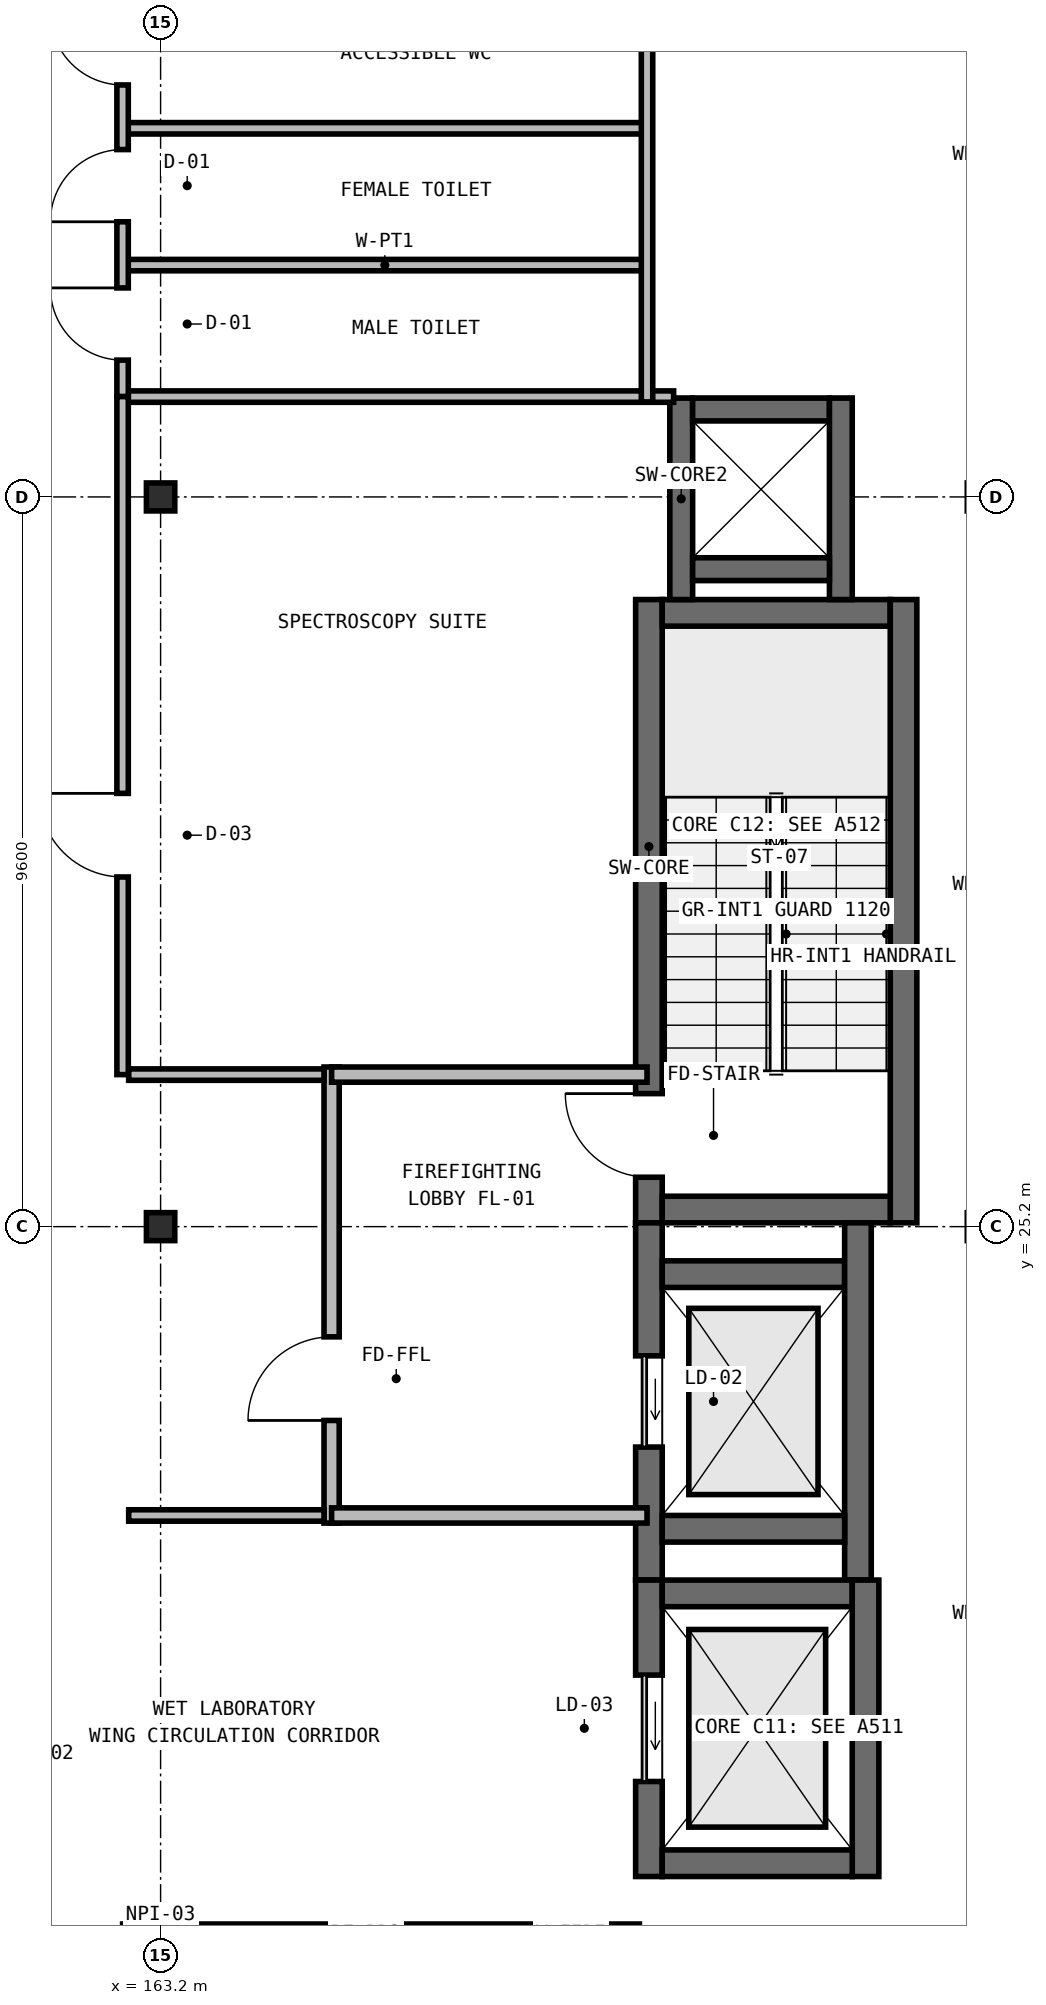
"""IFC4 building model, lengths in metres.
Left out: names, types, materials, properties, quantities, classifications, styles, units other than length and angle.
Written with IfcOpenShell. Run it as: python <this file> out.ifc"""

import sys

from ifc_helpers import new_model, si_unit, direction, frame, frame_2d, origin, origin_2d, place, context, subcontext, project, spatial, rectangle, i_section, extrude, element, fill, save


model = new_model("IFC4")
c1 = context("Model", 3, precision=1e-05, world=origin(), true_north=direction((0.0, 1.0)))
c2 = subcontext(c1, "Body", "Model", "MODEL_VIEW")
j1 = project(units=[si_unit("LENGTHUNIT", "METRE"), si_unit("PLANEANGLEUNIT", "RADIAN")], contexts=[c1])
p1 = place(None, origin())
s1 = spatial("IfcSite", under=j1, at=p1, CompositionType="ELEMENT")
p2 = place(p1, origin())
s2 = spatial("IfcBuilding", under=s1, at=p2, CompositionType="ELEMENT")
p3 = place(p2, frame((0.0, 0.0, 23.45)))
s3 = spatial("IfcBuildingStorey", under=s2, at=p3, CompositionType="ELEMENT", Elevation=23.45)
p4 = place(p3, frame((169.625, 25.25, 0.0), z_axis=(0.0, 0.0, 1.0), x_axis=(0.0, 1.0, 0.0)))
e1 = element("IfcWall", 1, at=p4, inside=s3, PredefinedType="SHEAR", context=c2, shape_type="SweptSolid", body=[
    extrude(rectangle(XDim=8.2, YDim=0.35, at=frame_2d((4.1, 0.0))), origin(), (0.0, 0.0, 1.0), 4.55),
])
p5 = place(p4, frame((0.6, 0.0, 0.0)))
e2 = element("IfcOpeningElement", 2, at=p5, cuts=e1, PredefinedType="OPENING", context=c2, shape_type="SweptSolid", body=[
    extrude(rectangle(XDim=1.1, YDim=2.15, at=frame_2d((0.55, 1.075))), frame((0.0, 0.185, 0.0), z_axis=(0.0, -1.0, 0.0), x_axis=(1.0, 0.0, 0.0)), (0.0, 0.0, 1.0), 0.37),
])
p6 = place(p3, frame((169.8, 33.275, 0.0), z_axis=(0.0, 0.0, 1.0), x_axis=(1.0, 0.0, 0.0)))
e3 = element("IfcWall", 3, at=p6, inside=s3, PredefinedType="SHEAR", context=c2, shape_type="SweptSolid", body=[
    extrude(rectangle(XDim=3.0, YDim=0.35, at=frame_2d((1.5, 0.0))), origin(), (0.0, 0.0, 1.0), 4.55),
])
p7 = place(p3, frame((172.975, 33.45, 0.0), z_axis=(0.0, 0.0, 1.0), x_axis=(0.0, -1.0, 0.0)))
e4 = element("IfcWall", 4, at=p7, inside=s3, PredefinedType="SHEAR", context=c2, shape_type="SweptSolid", body=[
    extrude(rectangle(XDim=8.2, YDim=0.35, at=frame_2d((4.1, 0.0))), origin(), (0.0, 0.0, 1.0), 4.55),
])
p8 = place(p3, frame((172.8, 25.425, 0.0), z_axis=(0.0, 0.0, 1.0), x_axis=(-1.0, 0.0, 0.0)))
e5 = element("IfcWall", 5, at=p8, inside=s3, PredefinedType="SHEAR", context=c2, shape_type="SweptSolid", body=[
    extrude(rectangle(XDim=3.0, YDim=0.35, at=frame_2d((1.5, 0.0))), origin(), (0.0, 0.0, 1.0), 4.55),
])
p9 = place(p3, frame((169.625, 20.55, 0.0), z_axis=(0.0, 0.0, 1.0), x_axis=(0.0, 1.0, 0.0)))
e6 = element("IfcWall", 6, at=p9, inside=s3, PredefinedType="SHEAR", context=c2, shape_type="SweptSolid", body=[
    extrude(rectangle(XDim=4.7, YDim=0.35, at=frame_2d((2.35, 0.0))), origin(), (0.0, 0.0, 1.0), 4.55),
])
p10 = place(p9, frame((1.75, 0.0, 0.0)))
e7 = element("IfcOpeningElement", 7, at=p10, cuts=e6, PredefinedType="OPENING", context=c2, shape_type="SweptSolid", body=[
    extrude(rectangle(XDim=1.2, YDim=2.15, at=frame_2d((0.6, 1.075))), frame((0.0, 0.185, 0.0), z_axis=(0.0, -1.0, 0.0), x_axis=(1.0, 0.0, 0.0)), (0.0, 0.0, 1.0), 0.37),
])
p11 = place(p3, frame((169.8, 24.575, 0.0), z_axis=(0.0, 0.0, 1.0), x_axis=(1.0, 0.0, 0.0)))
e8 = element("IfcWall", 8, at=p11, inside=s3, PredefinedType="SHEAR", context=c2, shape_type="SweptSolid", body=[
    extrude(rectangle(XDim=2.4, YDim=0.35, at=frame_2d((1.2, 0.0))), origin(), (0.0, 0.0, 1.0), 4.55),
])
p12 = place(p3, frame((172.375, 25.25, 0.0), z_axis=(0.0, 0.0, 1.0), x_axis=(0.0, -1.0, 0.0)))
e9 = element("IfcWall", 9, at=p12, inside=s3, PredefinedType="SHEAR", context=c2, shape_type="SweptSolid", body=[
    extrude(rectangle(XDim=4.7, YDim=0.35, at=frame_2d((2.35, 0.0))), origin(), (0.0, 0.0, 1.0), 4.55),
])
p13 = place(p3, frame((172.2, 21.225, 0.0), z_axis=(0.0, 0.0, 1.0), x_axis=(-1.0, 0.0, 0.0)))
e10 = element("IfcWall", 10, at=p13, inside=s3, PredefinedType="SHEAR", context=c2, shape_type="SweptSolid", body=[
    extrude(rectangle(XDim=2.4, YDim=0.35, at=frame_2d((1.2, 0.0))), origin(), (0.0, 0.0, 1.0), 4.55),
])
p14 = place(p3, frame((169.625, 16.65, 0.0), z_axis=(0.0, 0.0, 1.0), x_axis=(0.0, 1.0, 0.0)))
e11 = element("IfcWall", 11, at=p14, inside=s3, PredefinedType="SHEAR", context=c2, shape_type="SweptSolid", body=[
    extrude(rectangle(XDim=3.9, YDim=0.35, at=frame_2d((1.95, 0.0))), origin(), (0.0, 0.0, 1.0), 4.55),
])
p15 = place(p14, frame((1.25, 0.0, 0.0)))
e12 = element("IfcOpeningElement", 12, at=p15, cuts=e11, PredefinedType="OPENING", context=c2, shape_type="SweptSolid", body=[
    extrude(rectangle(XDim=1.4, YDim=2.3, at=frame_2d((0.7, 1.15))), frame((0.0, 0.185, 0.0), z_axis=(0.0, -1.0, 0.0), x_axis=(1.0, 0.0, 0.0)), (0.0, 0.0, 1.0), 0.37),
])
p16 = place(p3, frame((169.8, 20.375, 0.0), z_axis=(0.0, 0.0, 1.0), x_axis=(1.0, 0.0, 0.0)))
e13 = element("IfcWall", 13, at=p16, inside=s3, PredefinedType="SHEAR", context=c2, shape_type="SweptSolid", body=[
    extrude(rectangle(XDim=2.5, YDim=0.35, at=frame_2d((1.25, 0.0))), origin(), (0.0, 0.0, 1.0), 4.55),
])
p17 = place(p3, frame((172.475, 20.55, 0.0), z_axis=(0.0, 0.0, 1.0), x_axis=(0.0, -1.0, 0.0)))
e14 = element("IfcWall", 14, at=p17, inside=s3, PredefinedType="SHEAR", context=c2, shape_type="SweptSolid", body=[
    extrude(rectangle(XDim=3.9, YDim=0.35, at=frame_2d((1.95, 0.0))), origin(), (0.0, 0.0, 1.0), 4.55),
])
p18 = place(p3, frame((172.3, 16.825, 0.0), z_axis=(0.0, 0.0, 1.0), x_axis=(-1.0, 0.0, 0.0)))
e15 = element("IfcWall", 15, at=p18, inside=s3, PredefinedType="SHEAR", context=c2, shape_type="SweptSolid", body=[
    extrude(rectangle(XDim=2.5, YDim=0.35, at=frame_2d((1.25, 0.0))), origin(), (0.0, 0.0, 1.0), 4.55),
])
for number, where, z_axis, x_axis in (
    (16, (163.2, 25.2, 0.0), (0.0, 0.0, 1.0), (1.0, 0.0, 0.0)),
    (17, (163.2, 34.8, 0.0), (0.0, 0.0, 1.0), (1.0, 0.0, 0.0)),
):
    element("IfcColumn", number, at=place(p3, frame(where, z_axis=z_axis, x_axis=x_axis)), inside=s3, PredefinedType="COLUMN", context=c2, shape_type="SweptSolid", body=[
        extrude(i_section(OverallWidth=0.373, OverallDepth=0.368, WebThickness=0.017, FlangeThickness=0.027, at=origin_2d()), origin(), (0.0, 0.0, 1.0), 4.55),
    ])
p19 = place(p3, frame((170.05, 33.45, 0.0), z_axis=(0.0, 0.0, 1.0), x_axis=(0.0, 1.0, 0.0)))
e18 = element("IfcWall", 18, at=p19, inside=s3, PredefinedType="SHEAR", context=c2, shape_type="SweptSolid", body=[
    extrude(rectangle(XDim=2.65, YDim=0.3, at=frame_2d((1.325, 0.0))), origin(), (0.0, 0.0, 1.0), 4.37),
])
p20 = place(p3, frame((170.2, 35.95, 0.0), z_axis=(0.0, 0.0, 1.0), x_axis=(1.0, 0.0, 0.0)))
e19 = element("IfcWall", 19, at=p20, inside=s3, PredefinedType="SHEAR", context=c2, shape_type="SweptSolid", body=[
    extrude(rectangle(XDim=1.8, YDim=0.3, at=frame_2d((0.9, 0.0))), origin(), (0.0, 0.0, 1.0), 4.37),
])
p21 = place(p3, frame((172.15, 36.1, 0.0), z_axis=(0.0, 0.0, 1.0), x_axis=(0.0, -1.0, 0.0)))
e20 = element("IfcWall", 20, at=p21, inside=s3, PredefinedType="SHEAR", context=c2, shape_type="SweptSolid", body=[
    extrude(rectangle(XDim=2.65, YDim=0.3, at=frame_2d((1.325, 0.0))), origin(), (0.0, 0.0, 1.0), 4.37),
])
p22 = place(p3, frame((172.0, 33.85, 0.0), z_axis=(0.0, 0.0, 1.0), x_axis=(-1.0, 0.0, 0.0)))
e21 = element("IfcWall", 21, at=p22, inside=s3, PredefinedType="SHEAR", context=c2, shape_type="SweptSolid", body=[
    extrude(rectangle(XDim=1.8, YDim=0.3, at=frame_2d((0.9, 0.0))), origin(), (0.0, 0.0, 1.0), 4.37),
])
p23 = place(p3, frame((165.45, 21.3, 0.0), z_axis=(0.0, 0.0, 1.0), x_axis=(0.0, 1.0, 0.0)))
e22 = element("IfcWall", 22, at=p23, inside=s3, PredefinedType="SOLIDWALL", context=c2, shape_type="SweptSolid", body=[
    extrude(rectangle(XDim=6.0, YDim=0.2, at=frame_2d((3.0, 0.0))), origin(), (0.0, 0.0, 1.0), 4.3),
])
p24 = place(p23, frame((1.35, 0.0, 0.0)))
e23 = element("IfcOpeningElement", 23, at=p24, cuts=e22, PredefinedType="OPENING", context=c2, shape_type="SweptSolid", body=[
    extrude(rectangle(XDim=1.1, YDim=2.15, at=frame_2d((0.55, 1.075))), frame((0.0, 0.11, 0.0), z_axis=(0.0, -1.0, 0.0), x_axis=(1.0, 0.0, 0.0)), (0.0, 0.0, 1.0), 0.22),
])
for number, where, z_axis, x_axis in (
    (24, (165.45, 21.4, 0.0), (0.0, 0.0, 1.0), (1.0, 0.0, 0.0)),
    (25, (165.45, 27.2, 0.0), (0.0, 0.0, 1.0), (1.0, 0.0, 0.0)),
):
    element("IfcWall", number, at=place(p3, frame(where, z_axis=z_axis, x_axis=x_axis)), inside=s3, PredefinedType="SOLIDWALL", context=c2, shape_type="SweptSolid", body=[
        extrude(rectangle(XDim=4.15, YDim=0.2, at=frame_2d((2.075, 0.0))), origin(), (0.0, 0.0, 1.0), 4.3),
    ])
for number, where, z_axis, x_axis in (
    (26, (162.7, 37.85, 0.0), (0.0, 0.0, 1.0), (1.0, 0.0, 0.0)),
    (27, (162.7, 39.65, 0.0), (0.0, 0.0, 1.0), (1.0, 0.0, 0.0)),
):
    element("IfcWall", number, at=place(p3, frame(where, z_axis=z_axis, x_axis=x_axis)), inside=s3, PredefinedType="PARTITIONING", context=c2, shape_type="SweptSolid", body=[
        extrude(rectangle(XDim=6.9, YDim=0.15, at=frame_2d((3.45, 0.0))), origin(), (0.0, 0.0, 1.0), 4.3),
    ])
p25 = place(p3, frame((162.7, 36.12, 0.0), z_axis=(0.0, 0.0, 1.0), x_axis=(1.0, 0.0, 0.0)))
e28 = element("IfcWall", 28, at=p25, inside=s3, PredefinedType="PARTITIONING", context=c2, shape_type="SweptSolid", body=[
    extrude(rectangle(XDim=7.25, YDim=0.15, at=frame_2d((3.625, 0.0))), origin(), (0.0, 0.0, 1.0), 4.3),
])
p26 = place(p3, frame((169.6, 36.05, 0.0), z_axis=(0.0, 0.0, 1.0), x_axis=(0.0, 1.0, 0.0)))
e29 = element("IfcWall", 29, at=p26, inside=s3, PredefinedType="PARTITIONING", context=c2, shape_type="SweptSolid", body=[
    extrude(rectangle(XDim=5.5, YDim=0.15, at=frame_2d((2.75, 0.0))), origin(), (0.0, 0.0, 1.0), 4.3),
])
p27 = place(p3, frame((162.7, 36.12, 0.0), z_axis=(0.0, 0.0, 1.0), x_axis=(0.0, 1.0, 0.0)))
e30 = element("IfcWall", 30, at=p27, inside=s3, PredefinedType="PARTITIONING", context=c2, shape_type="SweptSolid", body=[
    extrude(rectangle(XDim=5.4, YDim=0.15, at=frame_2d((2.7, 0.0))), origin(), (0.0, 0.0, 1.0), 4.3),
])
p28 = place(p27, frame((0.48, 0.0, 0.0)))
e31 = element("IfcOpeningElement", 31, at=p28, cuts=e30, PredefinedType="OPENING", context=c2, shape_type="SweptSolid", body=[
    extrude(rectangle(XDim=0.95, YDim=2.1, at=frame_2d((0.475, 1.05))), frame((0.0, 0.085, 0.0), z_axis=(0.0, -1.0, 0.0), x_axis=(1.0, 0.0, 0.0)), (0.0, 0.0, 1.0), 0.17),
])
p29 = place(p27, frame((2.3, 0.0, 0.0)))
e32 = element("IfcOpeningElement", 32, at=p29, cuts=e30, PredefinedType="OPENING", context=c2, shape_type="SweptSolid", body=[
    extrude(rectangle(XDim=0.95, YDim=2.1, at=frame_2d((0.475, 1.05))), frame((0.0, 0.085, 0.0), z_axis=(0.0, -1.0, 0.0), x_axis=(1.0, 0.0, 0.0)), (0.0, 0.0, 1.0), 0.17),
])
p30 = place(p27, frame((4.1, 0.0, 0.0)))
e33 = element("IfcOpeningElement", 33, at=p30, cuts=e30, PredefinedType="OPENING", context=c2, shape_type="SweptSolid", body=[
    extrude(rectangle(XDim=0.95, YDim=2.1, at=frame_2d((0.475, 1.05))), frame((0.0, 0.085, 0.0), z_axis=(0.0, -1.0, 0.0), x_axis=(1.0, 0.0, 0.0)), (0.0, 0.0, 1.0), 0.17),
])
p31 = place(p3, frame((162.78, 27.2, 0.0), z_axis=(0.0, 0.0, 1.0), x_axis=(1.0, 0.0, 0.0)))
e34 = element("IfcWall", 34, at=p31, inside=s3, PredefinedType="PARTITIONING", context=c2, shape_type="SweptSolid", body=[
    extrude(rectangle(XDim=2.57, YDim=0.15, at=frame_2d((1.285, 0.0))), origin(), (0.0, 0.0, 1.0), 4.3),
])
p32 = place(p3, frame((162.7, 27.2, 0.0), z_axis=(0.0, 0.0, 1.0), x_axis=(0.0, 1.0, 0.0)))
e35 = element("IfcWall", 35, at=p32, inside=s3, PredefinedType="PARTITIONING", context=c2, shape_type="SweptSolid", body=[
    extrude(rectangle(XDim=8.92, YDim=0.15, at=frame_2d((4.46, 0.0))), origin(), (0.0, 0.0, 1.0), 4.3),
])
p33 = place(p32, frame((2.6, 0.0, 0.0)))
e36 = element("IfcOpeningElement", 36, at=p33, cuts=e35, PredefinedType="OPENING", context=c2, shape_type="SweptSolid", body=[
    extrude(rectangle(XDim=1.1, YDim=2.2, at=frame_2d((0.55, 1.1))), frame((0.0, 0.085, 0.0), z_axis=(0.0, -1.0, 0.0), x_axis=(1.0, 0.0, 0.0)), (0.0, 0.0, 1.0), 0.17),
])
p34 = place(p3, frame((162.78, 21.4, 0.0), z_axis=(0.0, 0.0, 1.0), x_axis=(1.0, 0.0, 0.0)))
e37 = element("IfcWall", 37, at=p34, inside=s3, PredefinedType="PARTITIONING", context=c2, shape_type="SweptSolid", body=[
    extrude(rectangle(XDim=2.57, YDim=0.15, at=frame_2d((1.285, 0.0))), origin(), (0.0, 0.0, 1.0), 4.3),
])
p35 = place(p3, frame((162.7, 15.95, 0.0), z_axis=(0.0, 0.0, 1.0), x_axis=(1.0, 0.0, 0.0)))
e38 = element("IfcWall", 38, at=p35, inside=s3, PredefinedType="PARTITIONING", context=c2, shape_type="SweptSolid", body=[
    extrude(rectangle(XDim=6.8, YDim=0.15, at=frame_2d((3.4, 0.0))), origin(), (0.0, 0.0, 1.0), 4.3),
])
p36 = place(p5, origin())
e39 = element("IfcDoor", 39, at=p36, inside=s3, OperationType="SINGLE_SWING_RIGHT", PredefinedType="DOOR", context=c2, shape_type="SweptSolid", body=[
    extrude(rectangle(XDim=1.1, YDim=2.15, at=frame_2d((0.55, 1.075))), frame((0.0, 0.025, 0.0), z_axis=(0.0, -1.0, 0.0), x_axis=(1.0, 0.0, 0.0)), (0.0, 0.0, 1.0), 0.05),
])
fill(e2, e39)
p37 = place(p10, origin())
e40 = element("IfcDoor", 40, at=p37, inside=s3, OperationType="SLIDING_TO_LEFT", PredefinedType="USERDEFINED", context=c2, shape_type="SweptSolid", body=[
    extrude(rectangle(XDim=1.2, YDim=2.15, at=frame_2d((0.6, 1.075))), frame((0.0, 0.025, 0.0), z_axis=(0.0, -1.0, 0.0), x_axis=(1.0, 0.0, 0.0)), (0.0, 0.0, 1.0), 0.05),
])
fill(e7, e40)
p38 = place(p15, origin())
e41 = element("IfcDoor", 41, at=p38, inside=s3, OperationType="SLIDING_TO_LEFT", PredefinedType="USERDEFINED", context=c2, shape_type="SweptSolid", body=[
    extrude(rectangle(XDim=1.4, YDim=2.3, at=frame_2d((0.7, 1.15))), frame((0.0, 0.025, 0.0), z_axis=(0.0, -1.0, 0.0), x_axis=(1.0, 0.0, 0.0)), (0.0, 0.0, 1.0), 0.05),
])
fill(e12, e41)
p39 = place(p24, origin())
e42 = element("IfcDoor", 42, at=p39, inside=s3, OperationType="SINGLE_SWING_LEFT", PredefinedType="DOOR", context=c2, shape_type="SweptSolid", body=[
    extrude(rectangle(XDim=1.1, YDim=2.15, at=frame_2d((0.55, 1.075))), frame((0.0, 0.025, 0.0), z_axis=(0.0, -1.0, 0.0), x_axis=(1.0, 0.0, 0.0)), (0.0, 0.0, 1.0), 0.05),
])
fill(e23, e42)
p40 = place(p28, origin())
e43 = element("IfcDoor", 43, at=p40, inside=s3, OperationType="SINGLE_SWING_RIGHT", PredefinedType="DOOR", context=c2, shape_type="SweptSolid", body=[
    extrude(rectangle(XDim=0.95, YDim=2.1, at=frame_2d((0.475, 1.05))), frame((0.0, 0.025, 0.0), z_axis=(0.0, -1.0, 0.0), x_axis=(1.0, 0.0, 0.0)), (0.0, 0.0, 1.0), 0.05),
])
fill(e31, e43)
p41 = place(p29, origin())
e44 = element("IfcDoor", 44, at=p41, inside=s3, OperationType="SINGLE_SWING_LEFT", PredefinedType="DOOR", context=c2, shape_type="SweptSolid", body=[
    extrude(rectangle(XDim=0.95, YDim=2.1, at=frame_2d((0.475, 1.05))), frame((0.0, 0.025, 0.0), z_axis=(0.0, -1.0, 0.0), x_axis=(1.0, 0.0, 0.0)), (0.0, 0.0, 1.0), 0.05),
])
fill(e32, e44)
p42 = place(p30, origin())
e45 = element("IfcDoor", 45, at=p42, inside=s3, OperationType="SINGLE_SWING_RIGHT", PredefinedType="DOOR", context=c2, shape_type="SweptSolid", body=[
    extrude(rectangle(XDim=0.95, YDim=2.1, at=frame_2d((0.475, 1.05))), frame((0.0, 0.025, 0.0), z_axis=(0.0, -1.0, 0.0), x_axis=(1.0, 0.0, 0.0)), (0.0, 0.0, 1.0), 0.05),
])
fill(e33, e45)
p43 = place(p33, origin())
e46 = element("IfcDoor", 46, at=p43, inside=s3, OperationType="SINGLE_SWING_RIGHT", PredefinedType="DOOR", context=c2, shape_type="SweptSolid", body=[
    extrude(rectangle(XDim=1.1, YDim=2.2, at=frame_2d((0.55, 1.1))), frame((0.0, 0.025, 0.0), z_axis=(0.0, -1.0, 0.0), x_axis=(1.0, 0.0, 0.0)), (0.0, 0.0, 1.0), 0.05),
])
fill(e36, e46)
save(model, sys.argv[1])
